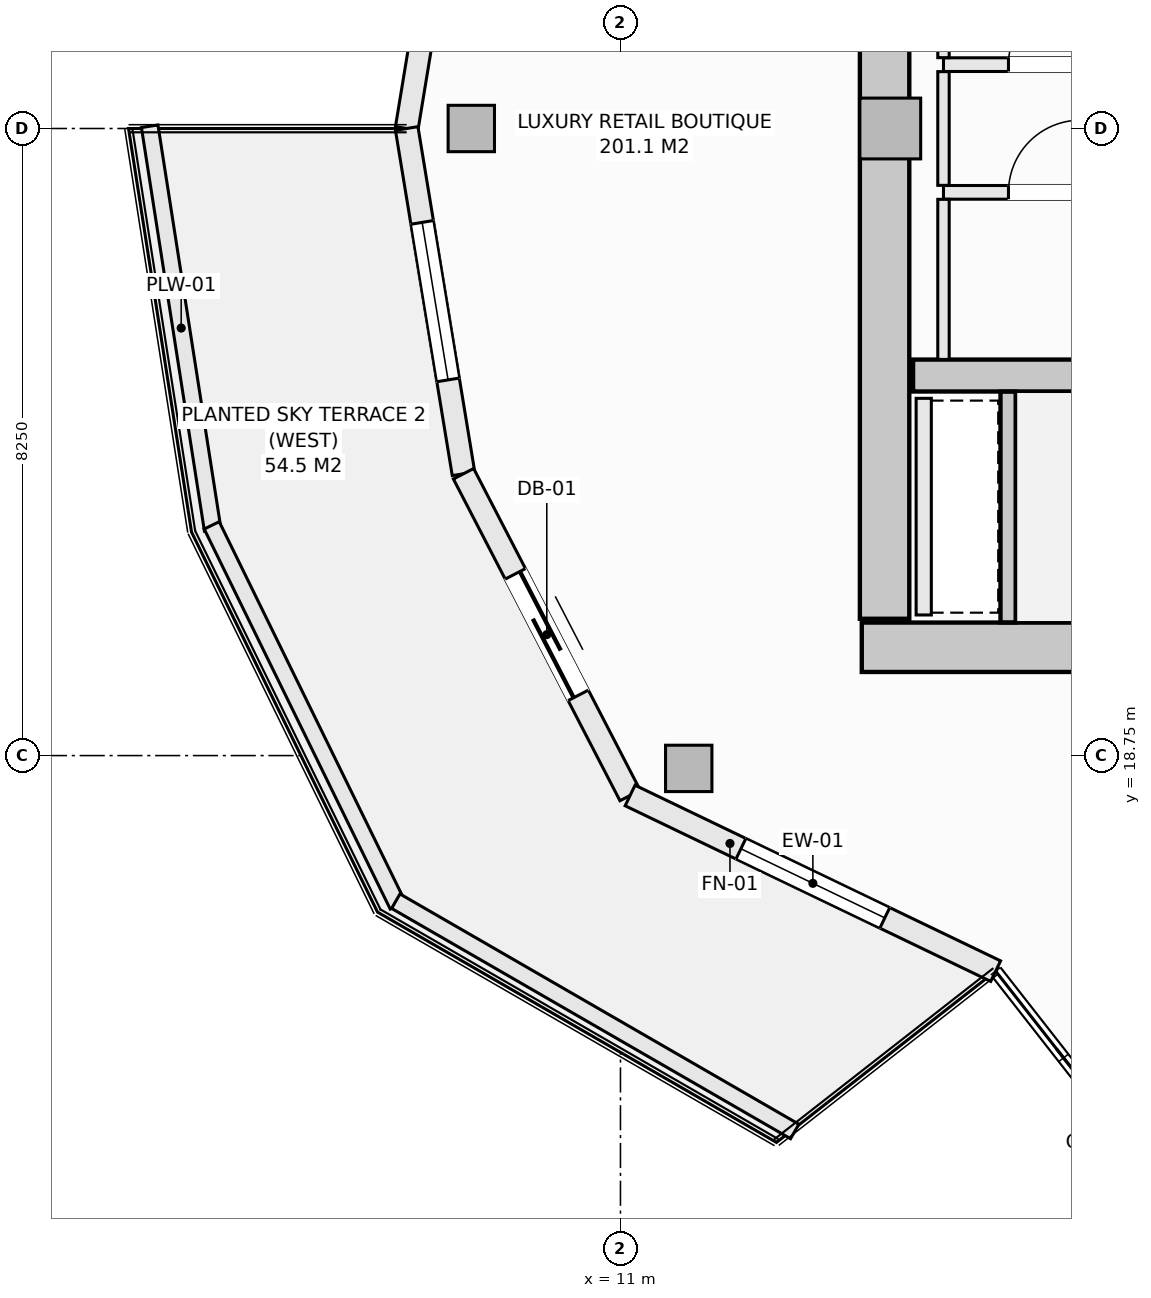
"""IFC4 building model, lengths in metres.
Left out: names, types, materials, properties, quantities, classifications, styles, units other than length and angle.
Written with IfcOpenShell. Run it as: python <this file> out.ifc"""

import sys

from ifc_helpers import new_model, si_unit, direction, frame, frame_2d, origin, origin_2d, place, context, subcontext, project, spatial, rectangle, hollow_rectangle, extrude, element, fill, save


model = new_model("IFC4")
c1 = context("Model", 3, precision=1e-05, world=origin(), true_north=direction((0.0, 1.0)))
c2 = subcontext(c1, "Body", "Model", "MODEL_VIEW")
j1 = project(units=[si_unit("LENGTHUNIT", "METRE"), si_unit("PLANEANGLEUNIT", "RADIAN")], contexts=[c1])
p1 = place(None, origin())
s1 = spatial("IfcSite", under=j1, at=p1, CompositionType="ELEMENT")
p2 = place(p1, origin())
s2 = spatial("IfcBuilding", under=s1, at=p2, CompositionType="ELEMENT")
p3 = place(p2, frame((0.0, 0.0, 176.7)))
s3 = spatial("IfcBuildingStorey", under=s2, at=p3, CompositionType="ELEMENT", Elevation=176.7)
p4 = place(p3, frame((14.175, 20.175, -0.27), z_axis=(0.0, 0.0, 1.0), x_axis=(1.0, 0.0, 0.0)))
e1 = element("IfcWall", 1, at=p4, inside=s3, PredefinedType="SHEAR", context=c2, shape_type="SweptSolid", body=[
    extrude(rectangle(XDim=13.65, YDim=0.65, at=frame_2d((6.825, 0.0))), origin(), (0.0, 0.0, 1.0), 3.4),
])
p5 = place(p3, frame((14.475, 20.55, -0.27), z_axis=(0.0, 0.0, 1.0), x_axis=(0.0, 1.0, 0.0)))
e2 = element("IfcWall", 2, at=p5, inside=s3, PredefinedType="SHEAR", context=c2, shape_type="SweptSolid", body=[
    extrude(rectangle(XDim=12.9, YDim=0.65, at=frame_2d((6.45, 0.0))), origin(), (0.0, 0.0, 1.0), 3.4),
])
p6 = place(p3, frame((14.85, 23.75, -0.27), z_axis=(0.0, 0.0, 1.0), x_axis=(1.0, 0.0, 0.0)))
e3 = element("IfcWall", 3, at=p6, inside=s3, PredefinedType="SHEAR", context=c2, shape_type="SweptSolid", body=[
    extrude(rectangle(XDim=7.3, YDim=0.42, at=frame_2d((3.65, 0.0))), origin(), (0.0, 0.0, 1.0), 3.4),
])
for number, where, z_axis, x_axis in (
    (4, (9.038, 27.0, -0.27), (0.0, 0.0, 1.0), (1.0, 0.0, 0.0)),
    (5, (11.898, 18.581, -0.27), (0.0, 0.0, 1.0), (1.0, 0.0, 0.0)),
):
    element("IfcColumn", number, at=place(p3, frame(where, z_axis=z_axis, x_axis=x_axis)), inside=s3, PredefinedType="COLUMN", context=c2, shape_type="SweptSolid", body=[
        extrude(hollow_rectangle(XDim=0.61, YDim=0.61, WallThickness=0.025, at=origin_2d()), origin(), (0.0, 0.0, 1.0), 3.4),
    ])
p7 = place(p3, frame((14.55, 27.0, -0.27), z_axis=(0.0, 0.0, 1.0), x_axis=(1.0, 0.0, 0.0)))
e6 = element("IfcColumn", 6, at=p7, inside=s3, PredefinedType="PILASTER", context=c2, shape_type="SweptSolid", body=[
    extrude(rectangle(XDim=0.8, YDim=0.8, at=origin_2d()), origin(), (0.0, 0.0, 1.0), 3.4),
])
p8 = place(p3, frame((8.188, 27.0, 0.0), z_axis=(0.0, 0.0, 1.0), x_axis=(0.162394765401, 0.986725868806, 0.0)))
e7 = element("IfcWall", 7, at=p8, inside=s3, PredefinedType="SOLIDWALL", context=c2, shape_type="SweptSolid", body=[
    extrude(rectangle(XDim=4.603, YDim=0.3, at=frame_2d((2.302, 0.0))), origin(), (0.0, 0.0, 1.0), 2.653),
])
p9 = place(p8, frame((1.252, 0.0, 0.74)))
e8 = element("IfcOpeningElement", 8, at=p9, cuts=e7, PredefinedType="OPENING", context=c2, shape_type="SweptSolid", body=[
    extrude(rectangle(XDim=2.1, YDim=1.7, at=frame_2d((1.05, 0.85))), frame((0.0, 0.16, 0.0), z_axis=(0.0, -1.0, 0.0), x_axis=(1.0, 0.0, 0.0)), (0.0, 0.0, 1.0), 0.32),
])
p10 = place(p3, frame((8.188, 27.0, 0.0), z_axis=(0.0, 0.0, 1.0), x_axis=(0.162394765401, -0.986725868806, 0.0)))
e9 = element("IfcWall", 9, at=p10, inside=s3, PredefinedType="SOLIDWALL", context=c2, shape_type="SweptSolid", body=[
    extrude(rectangle(XDim=4.603, YDim=0.3, at=frame_2d((2.302, 0.0))), origin(), (0.0, 0.0, 1.0), 2.653),
])
p11 = place(p10, frame((1.252, 0.0, 0.74)))
e10 = element("IfcOpeningElement", 10, at=p11, cuts=e9, PredefinedType="OPENING", context=c2, shape_type="SweptSolid", body=[
    extrude(rectangle(XDim=2.1, YDim=1.7, at=frame_2d((1.05, 0.85))), frame((0.0, 0.16, 0.0), z_axis=(0.0, -1.0, 0.0), x_axis=(1.0, 0.0, 0.0)), (0.0, 0.0, 1.0), 0.32),
])
p12 = place(p3, frame((8.935, 22.458, 0.0), z_axis=(0.0, 0.0, 1.0), x_axis=(0.459810251451, -0.888017191647, 0.0)))
e11 = element("IfcWall", 11, at=p12, inside=s3, PredefinedType="SOLIDWALL", context=c2, shape_type="SweptSolid", body=[
    extrude(rectangle(XDim=4.766, YDim=0.3, at=frame_2d((2.383, 0.0))), origin(), (0.0, 0.0, 1.0), 2.653),
])
p13 = place(p12, frame((1.483, 0.0, 0.0)))
e12 = element("IfcOpeningElement", 12, at=p13, cuts=e11, PredefinedType="OPENING", context=c2, shape_type="SweptSolid", body=[
    extrude(rectangle(XDim=1.8, YDim=2.25, at=frame_2d((0.9, 1.125))), frame((0.0, 0.16, 0.0), z_axis=(0.0, -1.0, 0.0), x_axis=(1.0, 0.0, 0.0)), (0.0, 0.0, 1.0), 0.32),
])
p14 = place(p3, frame((11.127, 18.225, 0.0), z_axis=(0.0, 0.0, 1.0), x_axis=(0.901353070301, -0.433085029363, 0.0)))
e13 = element("IfcWall", 13, at=p14, inside=s3, PredefinedType="SOLIDWALL", context=c2, shape_type="SweptSolid", body=[
    extrude(rectangle(XDim=5.336, YDim=0.3, at=frame_2d((2.668, 0.0))), origin(), (0.0, 0.0, 1.0), 2.653),
])
p15 = place(p14, frame((1.618, 0.0, 0.74)))
e14 = element("IfcOpeningElement", 14, at=p15, cuts=e13, PredefinedType="OPENING", context=c2, shape_type="SweptSolid", body=[
    extrude(rectangle(XDim=2.1, YDim=1.7, at=frame_2d((1.05, 0.85))), frame((0.0, 0.16, 0.0), z_axis=(0.0, -1.0, 0.0), x_axis=(1.0, 0.0, 0.0)), (0.0, 0.0, 1.0), 0.32),
])
p16 = place(p3, frame((4.806, 27.029, 0.0), z_axis=(0.0, 0.0, 1.0), x_axis=(0.154245214003, -0.988032597619, 0.0)))
e15 = element("IfcWall", 15, at=p16, inside=s3, PredefinedType="PARAPET", context=c2, shape_type="SweptSolid", body=[
    extrude(rectangle(XDim=5.374, YDim=0.22, at=frame_2d((2.687, 0.0))), origin(), (0.0, 0.0, 1.0), 0.52),
])
p17 = place(p3, frame((5.622, 21.779, 0.0), z_axis=(0.0, 0.0, 1.0), x_axis=(0.439637174641, -0.898175458735, 0.0)))
e16 = element("IfcWall", 16, at=p17, inside=s3, PredefinedType="PARAPET", context=c2, shape_type="SweptSolid", body=[
    extrude(rectangle(XDim=5.567, YDim=0.22, at=frame_2d((2.784, 0.0))), origin(), (0.0, 0.0, 1.0), 0.52),
])
p18 = place(p3, frame((8.044, 16.834, 0.0), z_axis=(0.0, 0.0, 1.0), x_axis=(0.866058128659, -0.499943314571, 0.0)))
e17 = element("IfcWall", 17, at=p18, inside=s3, PredefinedType="PARAPET", context=c2, shape_type="SweptSolid", body=[
    extrude(rectangle(XDim=6.06, YDim=0.22, at=frame_2d((3.03, 0.0))), origin(), (0.0, 0.0, 1.0), 0.52),
])
p19 = place(p3, frame((16.1, 20.502, -0.27), z_axis=(0.0, 0.0, 1.0), x_axis=(0.0, 1.0, 0.0)))
e18 = element("IfcWall", 18, at=p19, inside=s3, PredefinedType="SHEAR", context=c2, shape_type="SweptSolid", body=[
    extrude(rectangle(XDim=3.036, YDim=0.2, at=frame_2d((1.518, 0.0))), origin(), (0.0, 0.0, 1.0), 3.4),
])
p20 = place(p3, frame((14.99, 20.6, 0.0), z_axis=(0.0, 0.0, 1.0), x_axis=(0.0, 1.0, 0.0)))
e19 = element("IfcWall", 19, at=p20, inside=s3, PredefinedType="SOLIDWALL", context=c2, shape_type="SweptSolid", body=[
    extrude(rectangle(XDim=2.85, YDim=0.2, at=frame_2d((1.425, 0.0))), origin(), (0.0, 0.0, 1.0), 3.13),
])
p21 = place(p3, frame((15.25, 27.84, 0.0), z_axis=(0.0, 0.0, 1.0), x_axis=(1.0, 0.0, 0.0)))
e20 = element("IfcWall", 20, at=p21, inside=s3, PredefinedType="SOLIDWALL", context=c2, shape_type="SweptSolid", body=[
    extrude(rectangle(XDim=6.9, YDim=0.18, at=frame_2d((3.45, 0.0))), origin(), (0.0, 0.0, 1.0), 3.13),
])
p22 = place(p21, frame((5.02, 0.0, 0.0)))
e21 = element("IfcOpeningElement", 21, at=p22, cuts=e20, PredefinedType="OPENING", context=c2, shape_type="SweptSolid", body=[
    extrude(rectangle(XDim=0.95, YDim=2.1, at=frame_2d((0.475, 1.05))), frame((0.0, 0.1, 0.0), z_axis=(0.0, -1.0, 0.0), x_axis=(1.0, 0.0, 0.0)), (0.0, 0.0, 1.0), 0.2),
])
p23 = place(p21, frame((0.855, 0.0, 0.0)))
e22 = element("IfcOpeningElement", 22, at=p23, cuts=e20, PredefinedType="OPENING", context=c2, shape_type="SweptSolid", body=[
    extrude(rectangle(XDim=0.95, YDim=2.1, at=frame_2d((0.475, 1.05))), frame((0.0, 0.1, 0.0), z_axis=(0.0, -1.0, 0.0), x_axis=(1.0, 0.0, 0.0)), (0.0, 0.0, 1.0), 0.2),
])
p24 = place(p21, frame((2.9, 0.0, 0.0)))
e23 = element("IfcOpeningElement", 23, at=p24, cuts=e20, PredefinedType="OPENING", context=c2, shape_type="SweptSolid", body=[
    extrude(rectangle(XDim=0.95, YDim=2.1, at=frame_2d((0.475, 1.05))), frame((0.0, 0.1, 0.0), z_axis=(0.0, -1.0, 0.0), x_axis=(1.0, 0.0, 0.0)), (0.0, 0.0, 1.0), 0.2),
])
p25 = place(p3, frame((15.25, 26.16, 0.0), z_axis=(0.0, 0.0, 1.0), x_axis=(1.0, 0.0, 0.0)))
e24 = element("IfcWall", 24, at=p25, inside=s3, PredefinedType="SOLIDWALL", context=c2, shape_type="SweptSolid", body=[
    extrude(rectangle(XDim=6.9, YDim=0.18, at=frame_2d((3.45, 0.0))), origin(), (0.0, 0.0, 1.0), 3.13),
])
p26 = place(p25, frame((5.02, 0.0, 0.0)))
e25 = element("IfcOpeningElement", 25, at=p26, cuts=e24, PredefinedType="OPENING", context=c2, shape_type="SweptSolid", body=[
    extrude(rectangle(XDim=0.95, YDim=2.1, at=frame_2d((0.475, 1.05))), frame((0.0, 0.1, 0.0), z_axis=(0.0, -1.0, 0.0), x_axis=(1.0, 0.0, 0.0)), (0.0, 0.0, 1.0), 0.2),
])
p27 = place(p25, frame((0.855, 0.0, 0.0)))
e26 = element("IfcOpeningElement", 26, at=p27, cuts=e24, PredefinedType="OPENING", context=c2, shape_type="SweptSolid", body=[
    extrude(rectangle(XDim=0.95, YDim=2.1, at=frame_2d((0.475, 1.05))), frame((0.0, 0.1, 0.0), z_axis=(0.0, -1.0, 0.0), x_axis=(1.0, 0.0, 0.0)), (0.0, 0.0, 1.0), 0.2),
])
p28 = place(p25, frame((2.9, 0.0, 0.0)))
e27 = element("IfcOpeningElement", 27, at=p28, cuts=e24, PredefinedType="OPENING", context=c2, shape_type="SweptSolid", body=[
    extrude(rectangle(XDim=0.95, YDim=2.1, at=frame_2d((0.475, 1.05))), frame((0.0, 0.1, 0.0), z_axis=(0.0, -1.0, 0.0), x_axis=(1.0, 0.0, 0.0)), (0.0, 0.0, 1.0), 0.2),
])
p29 = place(p3, frame((15.25, 23.962, 0.0), z_axis=(0.0, 0.0, 1.0), x_axis=(0.0, 1.0, 0.0)))
e28 = element("IfcWall", 28, at=p29, inside=s3, PredefinedType="PARTITIONING", context=c2, shape_type="SweptSolid", body=[
    extrude(rectangle(XDim=2.106, YDim=0.15, at=frame_2d((1.053, 0.0))), origin(), (0.0, 0.0, 1.0), 3.13),
])
p30 = place(p3, frame((15.25, 26.252, 0.0), z_axis=(0.0, 0.0, 1.0), x_axis=(0.0, 1.0, 0.0)))
e29 = element("IfcWall", 29, at=p30, inside=s3, PredefinedType="PARTITIONING", context=c2, shape_type="SweptSolid", body=[
    extrude(rectangle(XDim=1.496, YDim=0.15, at=frame_2d((0.748, 0.0))), origin(), (0.0, 0.0, 1.0), 3.13),
])
p31 = place(p3, frame((15.25, 27.932, 0.0), z_axis=(0.0, 0.0, 1.0), x_axis=(0.0, 1.0, 0.0)))
e30 = element("IfcWall", 30, at=p31, inside=s3, PredefinedType="PARTITIONING", context=c2, shape_type="SweptSolid", body=[
    extrude(rectangle(XDim=2.106, YDim=0.15, at=frame_2d((1.053, 0.0))), origin(), (0.0, 0.0, 1.0), 3.13),
])
p32 = place(p11, origin())
e31 = element("IfcWindow", 31, at=p32, inside=s3, PartitioningType="SINGLE_PANEL", PredefinedType="WINDOW", context=c2, shape_type="SweptSolid", body=[
    extrude(rectangle(XDim=2.1, YDim=1.7, at=frame_2d((1.05, 0.85))), frame((0.0, 0.03, 0.0), z_axis=(0.0, -1.0, 0.0), x_axis=(1.0, 0.0, 0.0)), (0.0, 0.0, 1.0), 0.06),
])
fill(e10, e31)
p33 = place(p13, frame((1.8, 0.0, 0.0), z_axis=(0.0, 0.0, 1.0), x_axis=(-1.0, 0.0, 0.0)))
e32 = element("IfcDoor", 32, at=p33, inside=s3, OperationType="SLIDING_TO_LEFT", PredefinedType="DOOR", context=c2, shape_type="SweptSolid", body=[
    extrude(rectangle(XDim=1.8, YDim=2.25, at=frame_2d((0.9, 1.125))), frame((0.0, 0.025, 0.0), z_axis=(0.0, -1.0, 0.0), x_axis=(1.0, 0.0, 0.0)), (0.0, 0.0, 1.0), 0.05),
])
fill(e12, e32)
p34 = place(p15, origin())
e33 = element("IfcWindow", 33, at=p34, inside=s3, PartitioningType="SINGLE_PANEL", PredefinedType="WINDOW", context=c2, shape_type="SweptSolid", body=[
    extrude(rectangle(XDim=2.1, YDim=1.7, at=frame_2d((1.05, 0.85))), frame((0.0, 0.03, 0.0), z_axis=(0.0, -1.0, 0.0), x_axis=(1.0, 0.0, 0.0)), (0.0, 0.0, 1.0), 0.06),
])
fill(e14, e33)
p35 = place(p23, origin())
e34 = element("IfcDoor", 34, at=p35, inside=s3, OperationType="SINGLE_SWING_RIGHT", PredefinedType="DOOR", context=c2, shape_type="SweptSolid", body=[
    extrude(rectangle(XDim=0.95, YDim=2.1, at=frame_2d((0.475, 1.05))), frame((0.0, 0.025, 0.0), z_axis=(0.0, -1.0, 0.0), x_axis=(1.0, 0.0, 0.0)), (0.0, 0.0, 1.0), 0.05),
])
fill(e22, e34)
p36 = place(p27, origin())
e35 = element("IfcDoor", 35, at=p36, inside=s3, OperationType="SINGLE_SWING_RIGHT", PredefinedType="DOOR", context=c2, shape_type="SweptSolid", body=[
    extrude(rectangle(XDim=0.95, YDim=2.1, at=frame_2d((0.475, 1.05))), frame((0.0, 0.025, 0.0), z_axis=(0.0, -1.0, 0.0), x_axis=(1.0, 0.0, 0.0)), (0.0, 0.0, 1.0), 0.05),
])
fill(e26, e35)
save(model, sys.argv[1])
